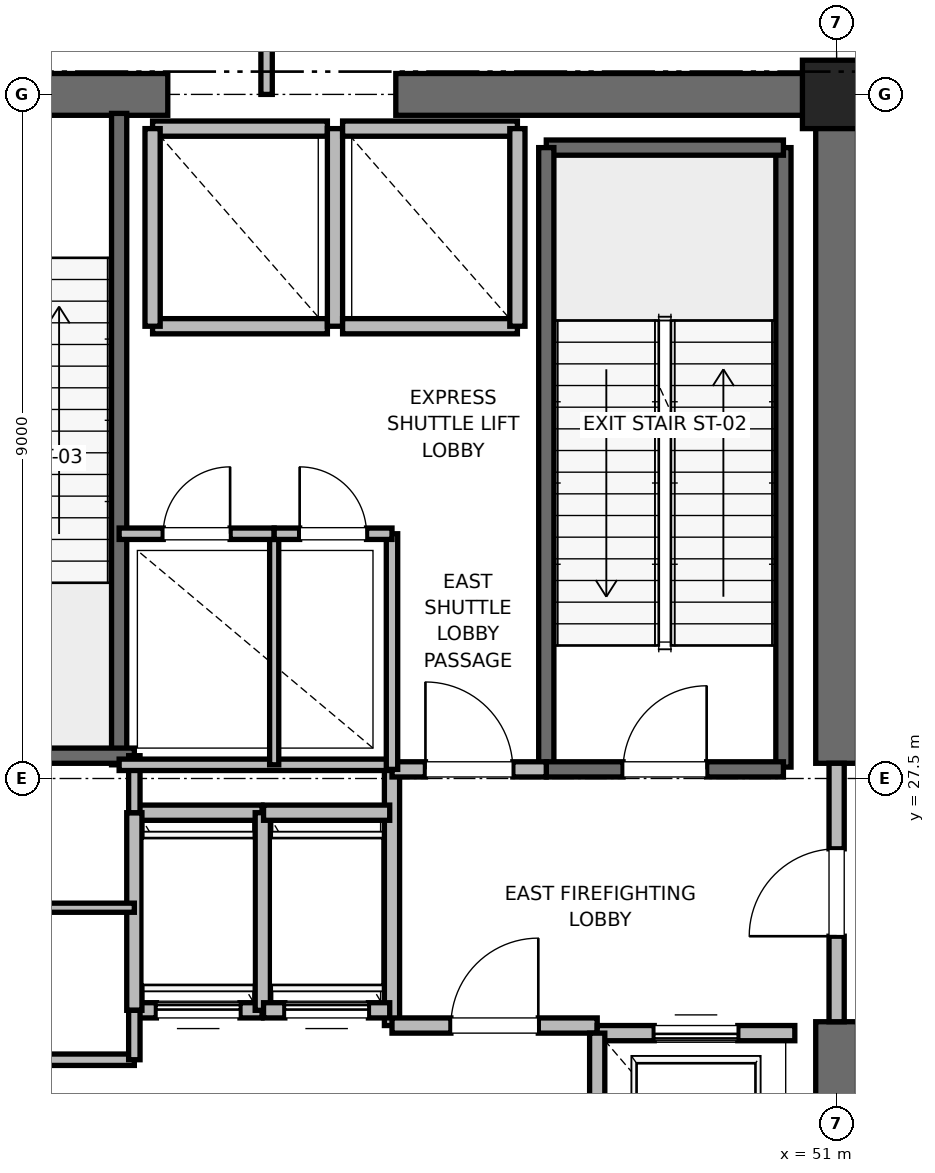
"""IFC4 building model, lengths in metres.
Left out: names, types, materials, properties, quantities, classifications, styles, units other than length and angle.
Written with IfcOpenShell. Run it as: python <this file> out.ifc"""

import sys

from ifc_helpers import new_model, si_unit, direction, frame, frame_2d, origin, origin_2d, place, context, subcontext, project, spatial, rectangle, extrude, element, fill, save


model = new_model("IFC4")
c1 = context("Model", 3, precision=1e-05, world=origin(), true_north=direction((0.0, 1.0)))
c2 = subcontext(c1, "Body", "Model", "MODEL_VIEW")
j1 = project(units=[si_unit("LENGTHUNIT", "METRE"), si_unit("PLANEANGLEUNIT", "RADIAN")], contexts=[c1])
p1 = place(None, origin())
s1 = spatial("IfcSite", under=j1, at=p1, CompositionType="ELEMENT")
p2 = place(p1, origin())
s2 = spatial("IfcBuilding", under=s1, at=p2, CompositionType="ELEMENT")
p3 = place(p2, frame((0.0, 0.0, 194.8)))
s3 = spatial("IfcBuildingStorey", under=s2, at=p3, CompositionType="ELEMENT", Elevation=194.8)
p4 = place(p3, frame((51.0, 36.5, 0.0), z_axis=(0.0, 0.0, 1.0), x_axis=(1.0, 0.0, 0.0)))
e1 = element("IfcColumn", 1, at=p4, inside=s3, PredefinedType="PILASTER", context=c2, shape_type="SweptSolid", body=[
    extrude(rectangle(XDim=0.9, YDim=0.9, at=origin_2d()), origin(), (0.0, 0.0, 1.0), 5.4),
])
p5 = place(p3, frame((37.8, 36.5, 0.0), z_axis=(0.0, 0.0, 1.0), x_axis=(1.0, 0.0, 0.0)))
e2 = element("IfcWall", 2, at=p5, inside=s3, PredefinedType="SHEAR", context=c2, shape_type="SweptSolid", body=[
    extrude(rectangle(XDim=4.4, YDim=0.55, at=frame_2d((2.2, 0.0))), origin(), (0.0, 0.0, 1.0), 5.1),
])
p6 = place(p5, frame((1.65, 0.0, 0.0)))
e3 = element("IfcOpeningElement", 3, at=p6, cuts=e2, PredefinedType="OPENING", context=c2, shape_type="SweptSolid", body=[
    extrude(rectangle(XDim=1.1, YDim=2.15, at=frame_2d((0.55, 1.075))), frame((0.0, 0.275, 0.0), z_axis=(0.0, -1.0, 0.0), x_axis=(1.0, 0.0, 0.0)), (0.0, 0.0, 1.0), 0.55),
])
for number, where, z_axis, x_axis in (
    (4, (45.2, 36.5, 0.0), (0.0, 0.0, 1.0), (1.0, 0.0, 0.0)),
    (5, (51.0, 18.5, 0.0), (0.0, 0.0, 1.0), (0.0, 1.0, 0.0)),
):
    element("IfcWall", number, at=place(p3, frame(where, z_axis=z_axis, x_axis=x_axis)), inside=s3, PredefinedType="SHEAR", context=c2, shape_type="SweptSolid", body=[
        extrude(rectangle(XDim=5.8, YDim=0.55, at=frame_2d((2.9, 0.0))), origin(), (0.0, 0.0, 1.0), 5.1),
    ])
p7 = place(p3, frame((51.0, 27.7, 0.0), z_axis=(0.0, 0.0, 1.0), x_axis=(0.0, 1.0, 0.0)))
e6 = element("IfcWall", 6, at=p7, inside=s3, PredefinedType="SHEAR", context=c2, shape_type="SweptSolid", body=[
    extrude(rectangle(XDim=8.8, YDim=0.55, at=frame_2d((4.4, 0.0))), origin(), (0.0, 0.0, 1.0), 5.1),
])
p8 = place(p3, frame((50.3, 27.65, 0.0), z_axis=(0.0, 0.0, 1.0), x_axis=(0.0, 1.0, 0.0)))
e7 = element("IfcWall", 7, at=p8, inside=s3, PredefinedType="SOLIDWALL", context=c2, shape_type="SweptSolid", body=[
    extrude(rectangle(XDim=8.15, YDim=0.2, at=frame_2d((4.075, 0.0))), origin(), (0.0, 0.0, 1.0), 5.1),
])
p9 = place(p3, frame((47.18, 35.8, 0.0), z_axis=(0.0, 0.0, 1.0), x_axis=(1.0, 0.0, 0.0)))
e8 = element("IfcWall", 8, at=p9, inside=s3, PredefinedType="SOLIDWALL", context=c2, shape_type="SweptSolid", body=[
    extrude(rectangle(XDim=3.12, YDim=0.2, at=frame_2d((1.56, 0.0))), origin(), (0.0, 0.0, 1.0), 5.1),
])
p10 = place(p3, frame((47.18, 27.62, 0.0), z_axis=(0.0, 0.0, 1.0), x_axis=(0.0, 1.0, 0.0)))
e9 = element("IfcWall", 9, at=p10, inside=s3, PredefinedType="SOLIDWALL", context=c2, shape_type="SweptSolid", body=[
    extrude(rectangle(XDim=8.18, YDim=0.2, at=frame_2d((4.09, 0.0))), origin(), (0.0, 0.0, 1.0), 5.1),
])
p11 = place(p3, frame((47.18, 27.62, 0.0), z_axis=(0.0, 0.0, 1.0), x_axis=(1.0, 0.0, 0.0)))
e10 = element("IfcWall", 10, at=p11, inside=s3, PredefinedType="SOLIDWALL", context=c2, shape_type="SweptSolid", body=[
    extrude(rectangle(XDim=3.12, YDim=0.2, at=frame_2d((1.56, 0.0))), origin(), (0.0, 0.0, 1.0), 5.1),
])
p12 = place(p11, frame((1.01, 0.0, 0.0)))
e11 = element("IfcOpeningElement", 11, at=p12, cuts=e10, PredefinedType="OPENING", context=c2, shape_type="SweptSolid", body=[
    extrude(rectangle(XDim=1.1, YDim=2.15, at=frame_2d((0.55, 1.075))), frame((0.0, 0.1, 0.0), z_axis=(0.0, -1.0, 0.0), x_axis=(1.0, 0.0, 0.0)), (0.0, 0.0, 1.0), 0.2),
])
p13 = place(p3, frame((41.56, 27.68, 0.0), z_axis=(0.0, 0.0, 1.0), x_axis=(0.0, 1.0, 0.0)))
e12 = element("IfcWall", 12, at=p13, inside=s3, PredefinedType="SOLIDWALL", context=c2, shape_type="SweptSolid", body=[
    extrude(rectangle(XDim=8.57, YDim=0.2, at=frame_2d((4.285, 0.0))), origin(), (0.0, 0.0, 1.0), 5.1),
])
p14 = place(p3, frame((38.44, 27.8, 0.0), z_axis=(0.0, 0.0, 1.0), x_axis=(1.0, 0.0, 0.0)))
e13 = element("IfcWall", 13, at=p14, inside=s3, PredefinedType="SOLIDWALL", context=c2, shape_type="SweptSolid", body=[
    extrude(rectangle(XDim=3.32, YDim=0.2, at=frame_2d((1.66, 0.0))), origin(), (0.0, 0.0, 1.0), 5.1),
])
p15 = place(p3, frame((45.15, 24.25, 0.0), z_axis=(0.0, 0.0, 1.0), x_axis=(0.0, 1.0, 0.0)))
e14 = element("IfcWall", 14, at=p15, inside=s3, PredefinedType="PARTITIONING", context=c2, shape_type="SweptSolid", body=[
    extrude(rectangle(XDim=3.37, YDim=0.2, at=frame_2d((1.685, 0.0))), origin(), (0.0, 0.0, 1.0), 5.1),
])
p16 = place(p3, frame((45.15, 24.25, 0.0), z_axis=(0.0, 0.0, 1.0), x_axis=(1.0, 0.0, 0.0)))
e15 = element("IfcWall", 15, at=p16, inside=s3, PredefinedType="PARTITIONING", context=c2, shape_type="SweptSolid", body=[
    extrude(rectangle(XDim=2.7, YDim=0.2, at=frame_2d((1.35, 0.0))), origin(), (0.0, 0.0, 1.0), 5.1),
])
p17 = place(p16, frame((0.775, 0.0, 0.0)))
e16 = element("IfcOpeningElement", 16, at=p17, cuts=e15, PredefinedType="OPENING", context=c2, shape_type="SweptSolid", body=[
    extrude(rectangle(XDim=1.15, YDim=2.2, at=frame_2d((0.575, 1.1))), frame((0.0, 0.1, 0.0), z_axis=(0.0, -1.0, 0.0), x_axis=(1.0, 0.0, 0.0)), (0.0, 0.0, 1.0), 0.2),
])
p18 = place(p3, frame((45.15, 27.62, 0.0), z_axis=(0.0, 0.0, 1.0), x_axis=(1.0, 0.0, 0.0)))
e17 = element("IfcWall", 17, at=p18, inside=s3, PredefinedType="PARTITIONING", context=c2, shape_type="SweptSolid", body=[
    extrude(rectangle(XDim=2.03, YDim=0.2, at=frame_2d((1.015, 0.0))), origin(), (0.0, 0.0, 1.0), 5.1),
])
p19 = place(p18, frame((0.44, 0.0, 0.0)))
e18 = element("IfcOpeningElement", 18, at=p19, cuts=e17, PredefinedType="OPENING", context=c2, shape_type="SweptSolid", body=[
    extrude(rectangle(XDim=1.15, YDim=2.2, at=frame_2d((0.575, 1.1))), frame((0.0, 0.1, 0.0), z_axis=(0.0, -1.0, 0.0), x_axis=(1.0, 0.0, 0.0)), (0.0, 0.0, 1.0), 0.2),
])
p20 = place(p3, frame((51.0, 24.3, 0.0), z_axis=(0.0, 0.0, 1.0), x_axis=(0.0, 1.0, 0.0)))
e19 = element("IfcWall", 19, at=p20, inside=s3, PredefinedType="PARTITIONING", context=c2, shape_type="SweptSolid", body=[
    extrude(rectangle(XDim=3.4, YDim=0.2, at=frame_2d((1.7, 0.0))), origin(), (0.0, 0.0, 1.0), 4.08),
])
p21 = place(p20, frame((1.125, 0.0, 0.0)))
e20 = element("IfcOpeningElement", 20, at=p21, cuts=e19, PredefinedType="OPENING", context=c2, shape_type="SweptSolid", body=[
    extrude(rectangle(XDim=1.15, YDim=2.2, at=frame_2d((0.575, 1.1))), frame((0.0, 0.1, 0.0), z_axis=(0.0, -1.0, 0.0), x_axis=(1.0, 0.0, 0.0)), (0.0, 0.0, 1.0), 0.2),
])
p22 = place(p3, frame((50.45, 24.15, 0.0), z_axis=(0.0, 0.0, 1.0), x_axis=(-1.0, 0.0, 0.0)))
e21 = element("IfcWall", 21, at=p22, inside=s3, PredefinedType="SOLIDWALL", context=c2, shape_type="SweptSolid", body=[
    extrude(rectangle(XDim=2.6, YDim=0.2, at=frame_2d((1.3, 0.0))), origin(), (0.0, 0.0, 1.0), 4.08),
])
p23 = place(p22, frame((0.75, 0.0, 0.0)))
e22 = element("IfcOpeningElement", 22, at=p23, cuts=e21, PredefinedType="OPENING", context=c2, shape_type="SweptSolid", body=[
    extrude(rectangle(XDim=1.1, YDim=2.2, at=frame_2d((0.55, 1.1))), frame((0.0, 0.1, 0.0), z_axis=(0.0, -1.0, 0.0), x_axis=(1.0, 0.0, 0.0)), (0.0, 0.0, 1.0), 0.2),
])
p24 = place(p3, frame((47.85, 24.15, 0.0), z_axis=(0.0, 0.0, 1.0), x_axis=(0.0, -1.0, 0.0)))
e23 = element("IfcWall", 23, at=p24, inside=s3, PredefinedType="SOLIDWALL", context=c2, shape_type="SweptSolid", body=[
    extrude(rectangle(XDim=3.0, YDim=0.2, at=frame_2d((1.5, 0.0))), origin(), (0.0, 0.0, 1.0), 5.1),
])
p25 = place(p3, frame((41.76, 24.45, 0.0), z_axis=(0.0, 0.0, 1.0), x_axis=(1.0, 0.0, 0.0)))
e24 = element("IfcWall", 24, at=p25, inside=s3, PredefinedType="SOLIDWALL", context=c2, shape_type="SweptSolid", body=[
    extrude(rectangle(XDim=1.68, YDim=0.2, at=frame_2d((0.84, 0.0))), origin(), (0.0, 0.0, 1.0), 5.1),
])
p26 = place(p25, frame((0.29, 0.0, 0.0)))
e25 = element("IfcOpeningElement", 25, at=p26, cuts=e24, PredefinedType="OPENING", context=c2, shape_type="SweptSolid", body=[
    extrude(rectangle(XDim=1.1, YDim=2.2, at=frame_2d((0.55, 1.1))), frame((0.0, 0.1, 0.0), z_axis=(0.0, -1.0, 0.0), x_axis=(1.0, 0.0, 0.0)), (0.0, 0.0, 1.0), 0.2),
])
p27 = place(p3, frame((43.44, 27.05, 0.0), z_axis=(0.0, 0.0, 1.0), x_axis=(-1.0, 0.0, 0.0)))
e26 = element("IfcWall", 26, at=p27, inside=s3, PredefinedType="SOLIDWALL", context=c2, shape_type="SweptSolid", body=[
    extrude(rectangle(XDim=1.68, YDim=0.2, at=frame_2d((0.84, 0.0))), origin(), (0.0, 0.0, 1.0), 5.1),
])
for number, where, z_axis, x_axis in (
    (27, (41.76, 27.05, 0.0), (0.0, 0.0, 1.0), (0.0, -1.0, 0.0)),
    (28, (43.45, 24.45, 0.0), (0.0, 0.0, 1.0), (0.0, 1.0, 0.0)),
):
    element("IfcWall", number, at=place(p3, frame(where, z_axis=z_axis, x_axis=x_axis)), inside=s3, PredefinedType="SOLIDWALL", context=c2, shape_type="SweptSolid", body=[
        extrude(rectangle(XDim=2.6, YDim=0.2, at=frame_2d((1.3, 0.0))), origin(), (0.0, 0.0, 1.0), 5.1),
    ])
p28 = place(p3, frame((43.46, 24.45, 0.0), z_axis=(0.0, 0.0, 1.0), x_axis=(1.0, 0.0, 0.0)))
e29 = element("IfcWall", 29, at=p28, inside=s3, PredefinedType="SOLIDWALL", context=c2, shape_type="SweptSolid", body=[
    extrude(rectangle(XDim=1.66, YDim=0.2, at=frame_2d((0.83, 0.0))), origin(), (0.0, 0.0, 1.0), 5.1),
])
p29 = place(p28, frame((0.28, 0.0, 0.0)))
e30 = element("IfcOpeningElement", 30, at=p29, cuts=e29, PredefinedType="OPENING", context=c2, shape_type="SweptSolid", body=[
    extrude(rectangle(XDim=1.1, YDim=2.2, at=frame_2d((0.55, 1.1))), frame((0.0, 0.1, 0.0), z_axis=(0.0, -1.0, 0.0), x_axis=(1.0, 0.0, 0.0)), (0.0, 0.0, 1.0), 0.2),
])
p30 = place(p3, frame((45.12, 27.05, 0.0), z_axis=(0.0, 0.0, 1.0), x_axis=(-1.0, 0.0, 0.0)))
e31 = element("IfcWall", 31, at=p30, inside=s3, PredefinedType="SOLIDWALL", context=c2, shape_type="SweptSolid", body=[
    extrude(rectangle(XDim=1.66, YDim=0.2, at=frame_2d((0.83, 0.0))), origin(), (0.0, 0.0, 1.0), 5.1),
])
p31 = place(p3, frame((42.0, 33.45, 0.0), z_axis=(0.0, 0.0, 1.0), x_axis=(1.0, 0.0, 0.0)))
e32 = element("IfcWall", 32, at=p31, inside=s3, PredefinedType="SOLIDWALL", context=c2, shape_type="SweptSolid", body=[
    extrude(rectangle(XDim=2.3, YDim=0.2, at=frame_2d((1.15, 0.0))), origin(), (0.0, 0.0, 1.0), 5.1),
])
p32 = place(p3, frame((44.3, 36.05, 0.0), z_axis=(0.0, 0.0, 1.0), x_axis=(-1.0, 0.0, 0.0)))
e33 = element("IfcWall", 33, at=p32, inside=s3, PredefinedType="SOLIDWALL", context=c2, shape_type="SweptSolid", body=[
    extrude(rectangle(XDim=2.3, YDim=0.2, at=frame_2d((1.15, 0.0))), origin(), (0.0, 0.0, 1.0), 4.08),
])
for number, where, z_axis, x_axis in (
    (34, (42.0, 36.05, 0.0), (0.0, 0.0, 1.0), (0.0, -1.0, 0.0)),
    (35, (44.4, 33.45, 0.0), (0.0, 0.0, 1.0), (0.0, 1.0, 0.0)),
):
    element("IfcWall", number, at=place(p3, frame(where, z_axis=z_axis, x_axis=x_axis)), inside=s3, PredefinedType="SOLIDWALL", context=c2, shape_type="SweptSolid", body=[
        extrude(rectangle(XDim=2.6, YDim=0.2, at=frame_2d((1.3, 0.0))), origin(), (0.0, 0.0, 1.0), 4.08),
    ])
p33 = place(p3, frame((44.5, 33.45, 0.0), z_axis=(0.0, 0.0, 1.0), x_axis=(1.0, 0.0, 0.0)))
e36 = element("IfcWall", 36, at=p33, inside=s3, PredefinedType="SOLIDWALL", context=c2, shape_type="SweptSolid", body=[
    extrude(rectangle(XDim=2.3, YDim=0.2, at=frame_2d((1.15, 0.0))), origin(), (0.0, 0.0, 1.0), 5.1),
])
p34 = place(p3, frame((46.8, 36.05, 0.0), z_axis=(0.0, 0.0, 1.0), x_axis=(-1.0, 0.0, 0.0)))
e37 = element("IfcWall", 37, at=p34, inside=s3, PredefinedType="SOLIDWALL", context=c2, shape_type="SweptSolid", body=[
    extrude(rectangle(XDim=2.3, YDim=0.2, at=frame_2d((1.15, 0.0))), origin(), (0.0, 0.0, 1.0), 4.08),
])
p35 = place(p3, frame((46.8, 33.45, 0.0), z_axis=(0.0, 0.0, 1.0), x_axis=(0.0, 1.0, 0.0)))
e38 = element("IfcWall", 38, at=p35, inside=s3, PredefinedType="SOLIDWALL", context=c2, shape_type="SweptSolid", body=[
    extrude(rectangle(XDim=2.6, YDim=0.2, at=frame_2d((1.3, 0.0))), origin(), (0.0, 0.0, 1.0), 5.1),
])
p36 = place(p3, frame((39.95, 23.8, 0.0), z_axis=(0.0, 0.0, 1.0), x_axis=(1.0, 0.0, 0.0)))
e39 = element("IfcWall", 39, at=p36, inside=s3, PredefinedType="PARTITIONING", context=c2, shape_type="SweptSolid", body=[
    extrude(rectangle(XDim=1.81, YDim=0.15, at=frame_2d((0.905, 0.0))), origin(), (0.0, 0.0, 1.0), 2.85),
])
p37 = place(p3, frame((39.95, 25.8, 0.0), z_axis=(0.0, 0.0, 1.0), x_axis=(1.0, 0.0, 0.0)))
e40 = element("IfcWall", 40, at=p37, inside=s3, PredefinedType="PARTITIONING", context=c2, shape_type="SweptSolid", body=[
    extrude(rectangle(XDim=1.81, YDim=0.12, at=frame_2d((0.905, 0.0))), origin(), (0.0, 0.0, 1.0), 2.85),
])
p38 = place(p3, frame((41.76, 23.8, 0.0), z_axis=(0.0, 0.0, 1.0), x_axis=(0.0, 1.0, 0.0)))
e41 = element("IfcWall", 41, at=p38, inside=s3, PredefinedType="PARTITIONING", context=c2, shape_type="SweptSolid", body=[
    extrude(rectangle(XDim=0.65, YDim=0.15, at=frame_2d((0.325, 0.0))), origin(), (0.0, 0.0, 1.0), 2.85),
])
p39 = place(p3, frame((41.76, 27.05, 0.0), z_axis=(0.0, 0.0, 1.0), x_axis=(0.0, 1.0, 0.0)))
e42 = element("IfcWall", 42, at=p39, inside=s3, PredefinedType="PARTITIONING", context=c2, shape_type="SweptSolid", body=[
    extrude(rectangle(XDim=0.75, YDim=0.15, at=frame_2d((0.375, 0.0))), origin(), (0.0, 0.0, 1.0), 2.85),
])
p40 = place(p3, frame((41.56, 27.68, 0.0), z_axis=(0.0, 0.0, 1.0), x_axis=(1.0, 0.0, 0.0)))
e43 = element("IfcWall", 43, at=p40, inside=s3, PredefinedType="PARTITIONING", context=c2, shape_type="SweptSolid", body=[
    extrude(rectangle(XDim=3.59, YDim=0.15, at=frame_2d((1.795, 0.0))), origin(), (0.0, 0.0, 1.0), 2.85),
])
p41 = place(p3, frame((45.15, 27.62, 0.0), z_axis=(0.0, 0.0, 1.0), x_axis=(0.0, 1.0, 0.0)))
e44 = element("IfcWall", 44, at=p41, inside=s3, PredefinedType="PARTITIONING", context=c2, shape_type="SweptSolid", body=[
    extrude(rectangle(XDim=3.1, YDim=0.15, at=frame_2d((1.55, 0.0))), origin(), (0.0, 0.0, 1.0), 2.85),
])
p42 = place(p3, frame((43.6, 27.68, 0.0), z_axis=(0.0, 0.0, 1.0), x_axis=(0.0, 1.0, 0.0)))
e45 = element("IfcWall", 45, at=p42, inside=s3, PredefinedType="PARTITIONING", context=c2, shape_type="SweptSolid", body=[
    extrude(rectangle(XDim=3.04, YDim=0.12, at=frame_2d((1.52, 0.0))), origin(), (0.0, 0.0, 1.0), 2.85),
])
p43 = place(p3, frame((41.56, 30.72, 0.0), z_axis=(0.0, 0.0, 1.0), x_axis=(1.0, 0.0, 0.0)))
e46 = element("IfcWall", 46, at=p43, inside=s3, PredefinedType="PARTITIONING", context=c2, shape_type="SweptSolid", body=[
    extrude(rectangle(XDim=2.04, YDim=0.15, at=frame_2d((1.02, 0.0))), origin(), (0.0, 0.0, 1.0), 2.85),
])
p44 = place(p43, frame((0.58, 0.0, 0.0)))
e47 = element("IfcOpeningElement", 47, at=p44, cuts=e46, PredefinedType="OPENING", context=c2, shape_type="SweptSolid", body=[
    extrude(rectangle(XDim=0.88, YDim=2.1, at=frame_2d((0.44, 1.05))), frame((0.0, 0.075, 0.0), z_axis=(0.0, -1.0, 0.0), x_axis=(1.0, 0.0, 0.0)), (0.0, 0.0, 1.0), 0.15),
])
p45 = place(p3, frame((43.6, 30.72, 0.0), z_axis=(0.0, 0.0, 1.0), x_axis=(1.0, 0.0, 0.0)))
e48 = element("IfcWall", 48, at=p45, inside=s3, PredefinedType="PARTITIONING", context=c2, shape_type="SweptSolid", body=[
    extrude(rectangle(XDim=1.55, YDim=0.15, at=frame_2d((0.775, 0.0))), origin(), (0.0, 0.0, 1.0), 2.85),
])
p46 = place(p45, frame((0.335, 0.0, 0.0)))
e49 = element("IfcOpeningElement", 49, at=p46, cuts=e48, PredefinedType="OPENING", context=c2, shape_type="SweptSolid", body=[
    extrude(rectangle(XDim=0.88, YDim=2.1, at=frame_2d((0.44, 1.05))), frame((0.0, 0.075, 0.0), z_axis=(0.0, -1.0, 0.0), x_axis=(1.0, 0.0, 0.0)), (0.0, 0.0, 1.0), 0.15),
])
p47 = place(p3, frame((43.5, 36.5, 0.0), z_axis=(0.0, 0.0, 1.0), x_axis=(0.0, 1.0, 0.0)))
e50 = element("IfcWall", 50, at=p47, inside=s3, PredefinedType="PARTITIONING", context=c2, shape_type="SweptSolid", body=[
    extrude(rectangle(XDim=2.7, YDim=0.15, at=frame_2d((1.35, 0.0))), origin(), (0.0, 0.0, 1.0), 2.85),
])
p48 = place(p47, frame((0.875, 0.0, 0.0)))
e51 = element("IfcOpeningElement", 51, at=p48, cuts=e50, PredefinedType="OPENING", context=c2, shape_type="SweptSolid", body=[
    extrude(rectangle(XDim=0.95, YDim=2.15, at=frame_2d((0.475, 1.075))), frame((0.0, 0.075, 0.0), z_axis=(0.0, -1.0, 0.0), x_axis=(1.0, 0.0, 0.0)), (0.0, 0.0, 1.0), 0.15),
])
p49 = place(p12, origin())
e52 = element("IfcDoor", 52, at=p49, inside=s3, OperationType="SINGLE_SWING_RIGHT", PredefinedType="DOOR", context=c2, shape_type="SweptSolid", body=[
    extrude(rectangle(XDim=1.1, YDim=2.15, at=frame_2d((0.55, 1.075))), frame((0.0, 0.025, 0.0), z_axis=(0.0, -1.0, 0.0), x_axis=(1.0, 0.0, 0.0)), (0.0, 0.0, 1.0), 0.05),
])
fill(e11, e52)
p50 = place(p17, origin())
e53 = element("IfcDoor", 53, at=p50, inside=s3, OperationType="SINGLE_SWING_RIGHT", PredefinedType="DOOR", context=c2, shape_type="SweptSolid", body=[
    extrude(rectangle(XDim=1.15, YDim=2.2, at=frame_2d((0.575, 1.1))), frame((0.0, 0.025, 0.0), z_axis=(0.0, -1.0, 0.0), x_axis=(1.0, 0.0, 0.0)), (0.0, 0.0, 1.0), 0.05),
])
fill(e16, e53)
p51 = place(p19, origin())
e54 = element("IfcDoor", 54, at=p51, inside=s3, OperationType="SINGLE_SWING_LEFT", PredefinedType="DOOR", context=c2, shape_type="SweptSolid", body=[
    extrude(rectangle(XDim=1.15, YDim=2.2, at=frame_2d((0.575, 1.1))), frame((0.0, 0.025, 0.0), z_axis=(0.0, -1.0, 0.0), x_axis=(1.0, 0.0, 0.0)), (0.0, 0.0, 1.0), 0.05),
])
fill(e18, e54)
p52 = place(p21, origin())
e55 = element("IfcDoor", 55, at=p52, inside=s3, OperationType="SINGLE_SWING_LEFT", PredefinedType="DOOR", context=c2, shape_type="SweptSolid", body=[
    extrude(rectangle(XDim=1.15, YDim=2.2, at=frame_2d((0.575, 1.1))), frame((0.0, 0.025, 0.0), z_axis=(0.0, -1.0, 0.0), x_axis=(1.0, 0.0, 0.0)), (0.0, 0.0, 1.0), 0.05),
])
fill(e20, e55)
p53 = place(p23, origin())
e56 = element("IfcDoor", 56, at=p53, inside=s3, OperationType="SLIDING_TO_RIGHT", PredefinedType="DOOR", context=c2, shape_type="SweptSolid", body=[
    extrude(rectangle(XDim=1.1, YDim=2.2, at=frame_2d((0.55, 1.1))), frame((0.0, 0.025, 0.0), z_axis=(0.0, -1.0, 0.0), x_axis=(1.0, 0.0, 0.0)), (0.0, 0.0, 1.0), 0.05),
])
fill(e22, e56)
p54 = place(p26, origin())
e57 = element("IfcDoor", 57, at=p54, inside=s3, OperationType="SLIDING_TO_RIGHT", PredefinedType="DOOR", context=c2, shape_type="SweptSolid", body=[
    extrude(rectangle(XDim=1.1, YDim=2.2, at=frame_2d((0.55, 1.1))), frame((0.0, 0.025, 0.0), z_axis=(0.0, -1.0, 0.0), x_axis=(1.0, 0.0, 0.0)), (0.0, 0.0, 1.0), 0.05),
])
fill(e25, e57)
p55 = place(p29, origin())
e58 = element("IfcDoor", 58, at=p55, inside=s3, OperationType="SLIDING_TO_RIGHT", PredefinedType="DOOR", context=c2, shape_type="SweptSolid", body=[
    extrude(rectangle(XDim=1.1, YDim=2.2, at=frame_2d((0.55, 1.1))), frame((0.0, 0.025, 0.0), z_axis=(0.0, -1.0, 0.0), x_axis=(1.0, 0.0, 0.0)), (0.0, 0.0, 1.0), 0.05),
])
fill(e30, e58)
p56 = place(p44, origin())
e59 = element("IfcDoor", 59, at=p56, inside=s3, OperationType="SINGLE_SWING_RIGHT", PredefinedType="DOOR", context=c2, shape_type="SweptSolid", body=[
    extrude(rectangle(XDim=0.88, YDim=2.1, at=frame_2d((0.44, 1.05))), frame((0.0, 0.025, 0.0), z_axis=(0.0, -1.0, 0.0), x_axis=(1.0, 0.0, 0.0)), (0.0, 0.0, 1.0), 0.05),
])
fill(e47, e59)
p57 = place(p46, origin())
e60 = element("IfcDoor", 60, at=p57, inside=s3, OperationType="SINGLE_SWING_LEFT", PredefinedType="DOOR", context=c2, shape_type="SweptSolid", body=[
    extrude(rectangle(XDim=0.88, YDim=2.1, at=frame_2d((0.44, 1.05))), frame((0.0, 0.025, 0.0), z_axis=(0.0, -1.0, 0.0), x_axis=(1.0, 0.0, 0.0)), (0.0, 0.0, 1.0), 0.05),
])
fill(e49, e60)
save(model, sys.argv[1])
